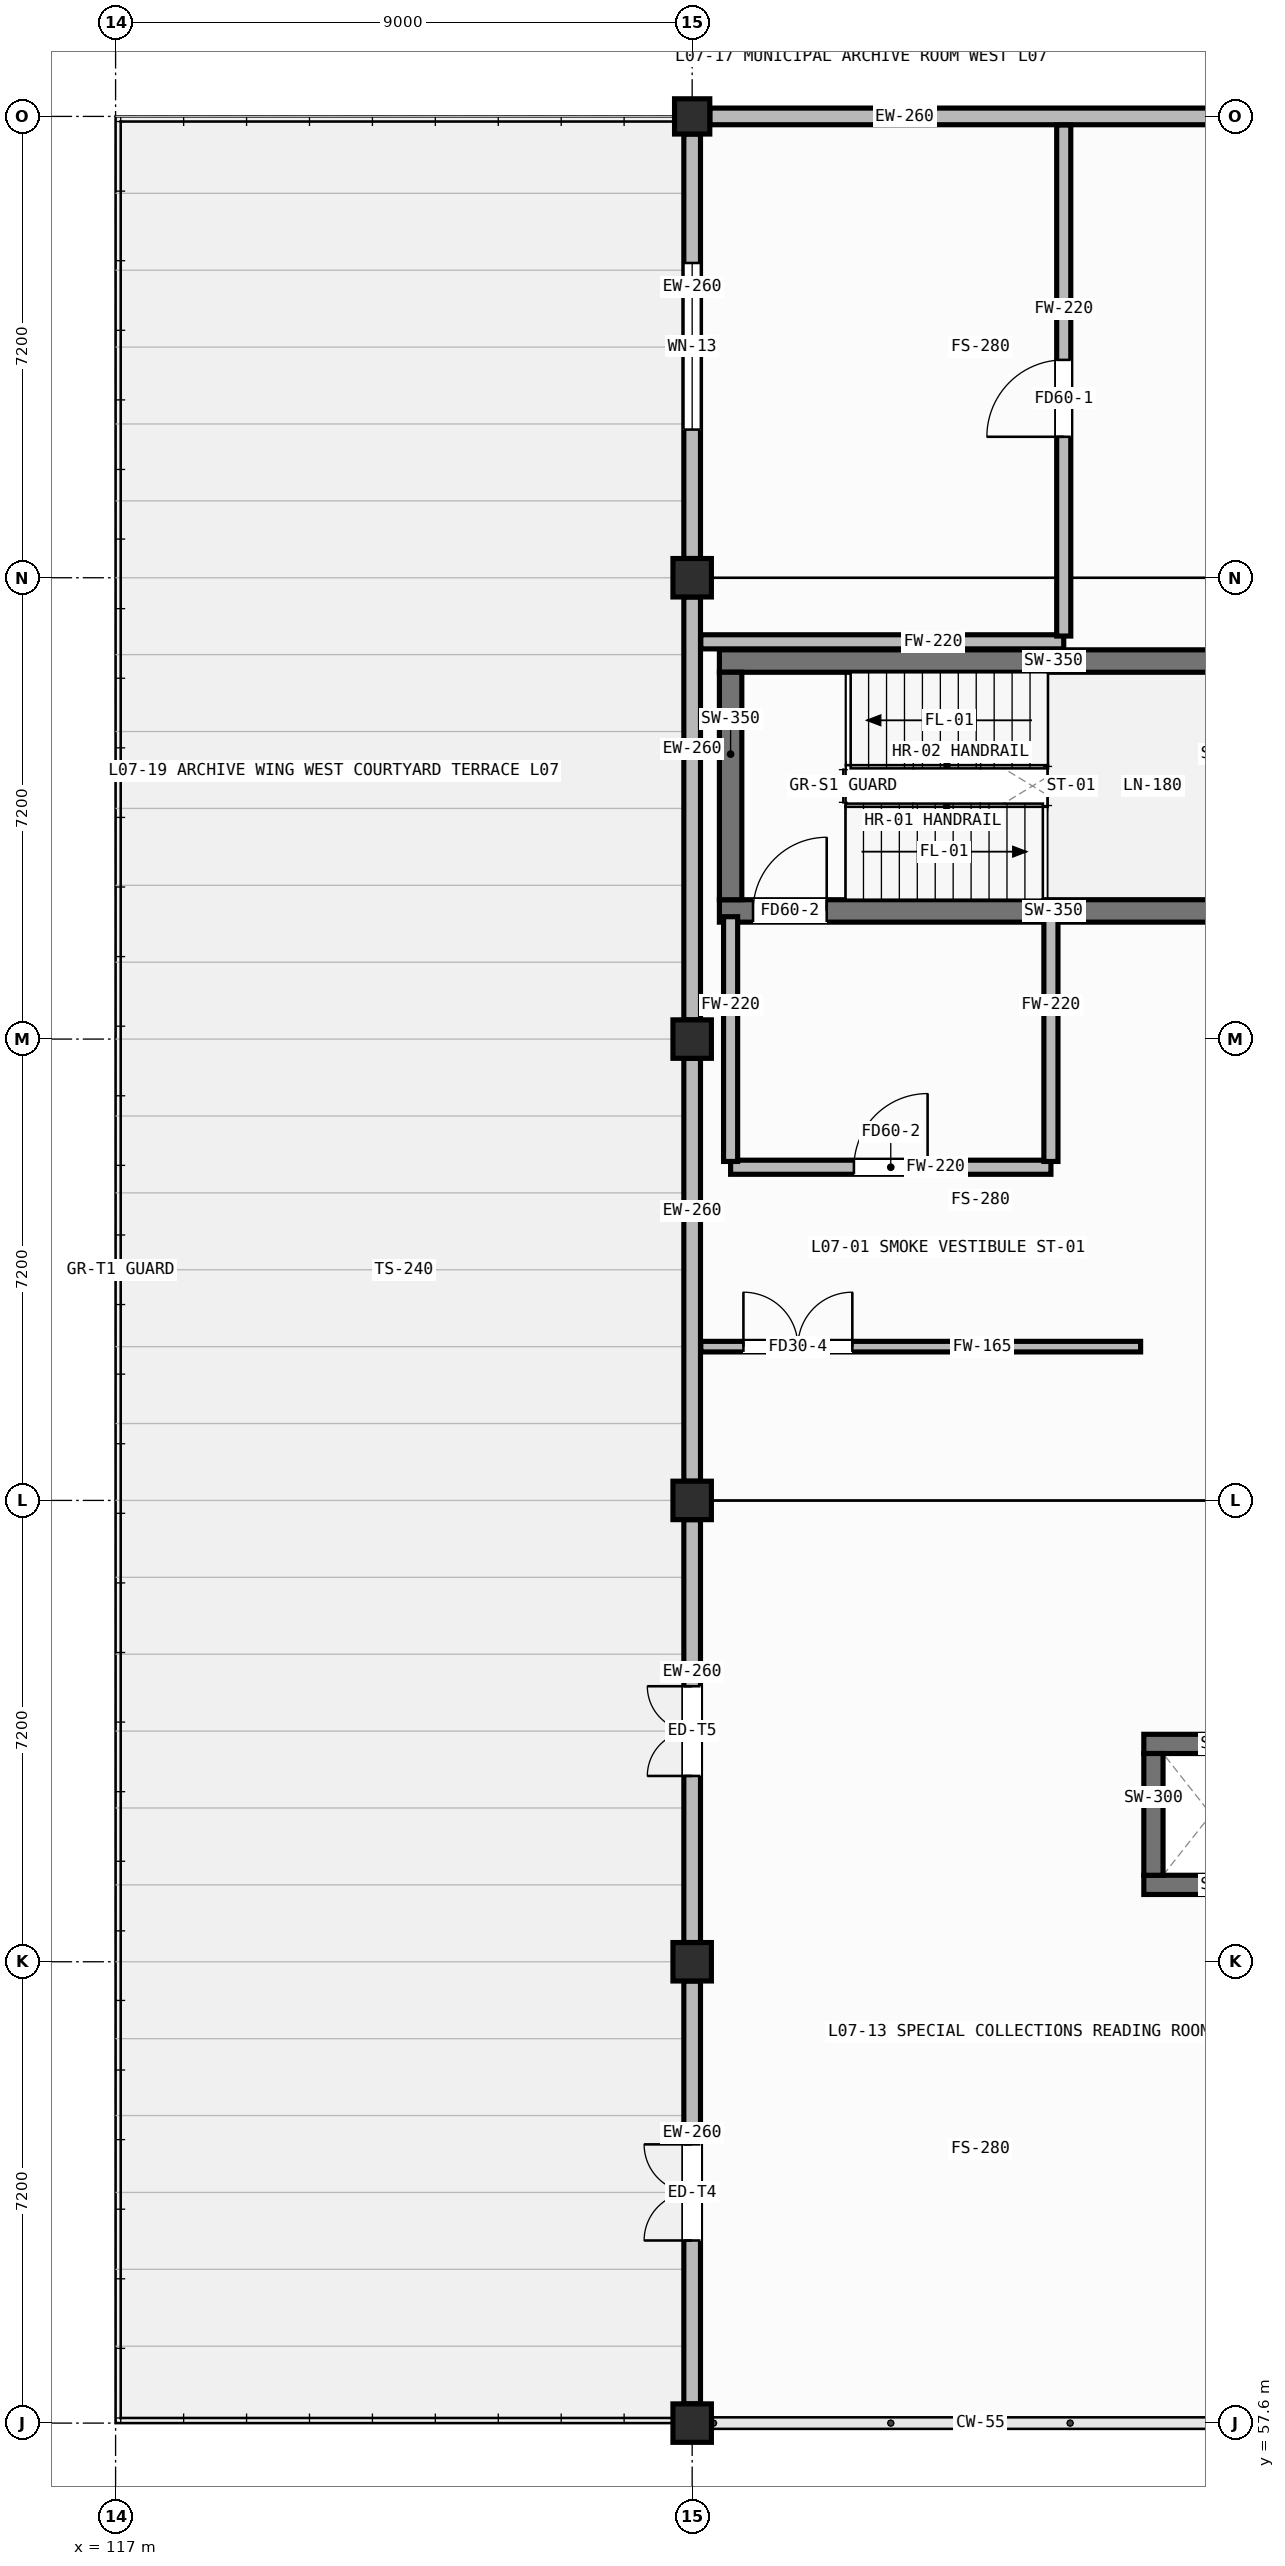
"""IFC4 building model, lengths in metres.
Left out: names, types, materials, properties, quantities, classifications, styles, units other than length and angle.
Written with IfcOpenShell. Run it as: python <this file> out.ifc"""

import sys

from ifc_helpers import new_model, si_unit, direction, frame, frame_2d, origin, origin_2d, place, context, subcontext, project, spatial, rectangle, hollow_rectangle, extrude, element, fill, save


model = new_model("IFC4")
c1 = context("Model", 3, precision=1e-05, world=origin(), true_north=direction((0.0, 1.0)))
c2 = subcontext(c1, "Body", "Model", "MODEL_VIEW")
j1 = project(units=[si_unit("LENGTHUNIT", "METRE"), si_unit("PLANEANGLEUNIT", "RADIAN")], contexts=[c1])
p1 = place(None, origin())
s1 = spatial("IfcSite", under=j1, at=p1, CompositionType="ELEMENT")
p2 = place(p1, origin())
s2 = spatial("IfcBuilding", under=s1, at=p2, CompositionType="ELEMENT")
p3 = place(p2, frame((0.0, 0.0, 24.2)))
s3 = spatial("IfcBuildingStorey", under=s2, at=p3, CompositionType="ELEMENT", Elevation=24.2)
for number, where, z_axis, x_axis in (
    (1, (126.0, 57.6, 0.0), (0.0, 0.0, 1.0), (1.0, 0.0, 0.0)),
    (2, (126.0, 64.8, 0.0), (0.0, 0.0, 1.0), (1.0, 0.0, 0.0)),
    (3, (126.0, 72.0, 0.0), (0.0, 0.0, 1.0), (1.0, 0.0, 0.0)),
    (4, (126.0, 79.2, 0.0), (0.0, 0.0, 1.0), (1.0, 0.0, 0.0)),
    (5, (126.0, 86.4, 0.0), (0.0, 0.0, 1.0), (1.0, 0.0, 0.0)),
):
    element("IfcColumn", number, at=place(p3, frame(where, z_axis=z_axis, x_axis=x_axis)), inside=s3, PredefinedType="COLUMN", context=c2, shape_type="SweptSolid", body=[
        extrude(hollow_rectangle(XDim=0.6, YDim=0.6, WallThickness=0.025, at=origin_2d()), origin(), (0.0, 0.0, 1.0), 3.6),
    ])
p4 = place(p3, frame((126.0, 93.6, 0.0), z_axis=(0.0, 0.0, 1.0), x_axis=(1.0, 0.0, 0.0)))
e6 = element("IfcColumn", 6, at=p4, inside=s3, PredefinedType="COLUMN", context=c2, shape_type="SweptSolid", body=[
    extrude(hollow_rectangle(XDim=0.55, YDim=0.55, WallThickness=0.022, at=origin_2d()), origin(), (0.0, 0.0, 1.0), 3.6),
])
p5 = place(p3, frame((134.725, 93.6, 0.0), z_axis=(0.0, 0.0, 1.0), x_axis=(-1.0, 0.0, 0.0)))
e7 = element("IfcWall", 7, at=p5, inside=s3, PredefinedType="STANDARD", context=c2, shape_type="SweptSolid", body=[
    extrude(rectangle(XDim=8.45, YDim=0.26, at=frame_2d((4.225, 0.0))), origin(), (0.0, 0.0, 1.0), 2.92),
])
p6 = place(p3, frame((126.0, 57.9, 0.0), z_axis=(0.0, 0.0, 1.0), x_axis=(0.0, 1.0, 0.0)))
e8 = element("IfcWall", 8, at=p6, inside=s3, PredefinedType="STANDARD", context=c2, shape_type="SweptSolid", body=[
    extrude(rectangle(XDim=6.6, YDim=0.26, at=frame_2d((3.3, 0.0))), origin(), (0.0, 0.0, 1.0), 2.92),
])
p7 = place(p6, frame((2.55, 0.0, 0.0)))
e9 = element("IfcOpeningElement", 9, at=p7, cuts=e8, PredefinedType="OPENING", context=c2, shape_type="SweptSolid", body=[
    extrude(rectangle(XDim=1.5, YDim=2.05, at=frame_2d((0.75, 1.025))), frame((0.0, 0.142, 0.0), z_axis=(0.0, -1.0, 0.0), x_axis=(1.0, 0.0, 0.0)), (0.0, 0.0, 1.0), 0.284),
])
p8 = place(p3, frame((126.0, 65.1, 0.0), z_axis=(0.0, 0.0, 1.0), x_axis=(0.0, 1.0, 0.0)))
e10 = element("IfcWall", 10, at=p8, inside=s3, PredefinedType="STANDARD", context=c2, shape_type="SweptSolid", body=[
    extrude(rectangle(XDim=6.6, YDim=0.26, at=frame_2d((3.3, 0.0))), origin(), (0.0, 0.0, 1.0), 2.92),
])
p9 = place(p8, frame((2.6, 0.0, 0.0)))
e11 = element("IfcOpeningElement", 11, at=p9, cuts=e10, PredefinedType="OPENING", context=c2, shape_type="SweptSolid", body=[
    extrude(rectangle(XDim=1.4, YDim=2.02, at=frame_2d((0.7, 1.01))), frame((0.0, 0.142, 0.0), z_axis=(0.0, -1.0, 0.0), x_axis=(1.0, 0.0, 0.0)), (0.0, 0.0, 1.0), 0.284),
])
p10 = place(p3, frame((126.0, 72.3, 0.0), z_axis=(0.0, 0.0, 1.0), x_axis=(0.0, 1.0, 0.0)))
e12 = element("IfcWall", 12, at=p10, inside=s3, PredefinedType="STANDARD", context=c2, shape_type="SweptSolid", body=[
    extrude(rectangle(XDim=6.6, YDim=0.26, at=frame_2d((3.3, 0.0))), origin(), (0.0, 0.0, 1.0), 2.92),
])
p11 = place(p3, frame((126.0, 79.5, 0.0), z_axis=(0.0, 0.0, 1.0), x_axis=(0.0, 1.0, 0.0)))
e13 = element("IfcWall", 13, at=p11, inside=s3, PredefinedType="STANDARD", context=c2, shape_type="SweptSolid", body=[
    extrude(rectangle(XDim=6.6, YDim=0.26, at=frame_2d((3.3, 0.0))), origin(), (0.0, 0.0, 1.0), 2.92),
])
p12 = place(p3, frame((126.0, 86.7, 0.0), z_axis=(0.0, 0.0, 1.0), x_axis=(0.0, 1.0, 0.0)))
e14 = element("IfcWall", 14, at=p12, inside=s3, PredefinedType="STANDARD", context=c2, shape_type="SweptSolid", body=[
    extrude(rectangle(XDim=6.625, YDim=0.26, at=frame_2d((3.312, 0.0))), origin(), (0.0, 0.0, 1.0), 2.92),
])
p13 = place(p12, frame((2.012, 0.0, 0.85)))
e15 = element("IfcOpeningElement", 15, at=p13, cuts=e14, PredefinedType="OPENING", context=c2, shape_type="SweptSolid", body=[
    extrude(rectangle(XDim=2.6, YDim=1.6, at=frame_2d((1.3, 0.8))), frame((0.0, 0.142, 0.0), z_axis=(0.0, -1.0, 0.0), x_axis=(1.0, 0.0, 0.0)), (0.0, 0.0, 1.0), 0.284),
])
p14 = place(p3, frame((126.425, 81.2, 0.0), z_axis=(0.0, 0.0, 1.0), x_axis=(1.0, 0.0, 0.0)))
e16 = element("IfcWall", 16, at=p14, inside=s3, PredefinedType="SHEAR", context=c2, shape_type="SweptSolid", body=[
    extrude(rectangle(XDim=8.15, YDim=0.35, at=frame_2d((4.075, 0.0))), origin(), (0.0, 0.0, 1.0), 3.32),
])
p15 = place(p14, frame((0.525, 0.0, 0.0)))
e17 = element("IfcOpeningElement", 17, at=p15, cuts=e16, PredefinedType="OPENING", context=c2, shape_type="SweptSolid", body=[
    extrude(rectangle(XDim=1.15, YDim=2.1, at=frame_2d((0.575, 1.05))), frame((0.0, 0.187, 0.0), z_axis=(0.0, -1.0, 0.0), x_axis=(1.0, 0.0, 0.0)), (0.0, 0.0, 1.0), 0.374),
])
p16 = place(p3, frame((126.425, 85.1, 0.0), z_axis=(0.0, 0.0, 1.0), x_axis=(1.0, 0.0, 0.0)))
e18 = element("IfcWall", 18, at=p16, inside=s3, PredefinedType="SHEAR", context=c2, shape_type="SweptSolid", body=[
    extrude(rectangle(XDim=8.15, YDim=0.35, at=frame_2d((4.075, 0.0))), origin(), (0.0, 0.0, 1.0), 3.32),
])
p17 = place(p3, frame((126.6, 81.375, 0.0), z_axis=(0.0, 0.0, 1.0), x_axis=(0.0, 1.0, 0.0)))
e19 = element("IfcWall", 19, at=p17, inside=s3, PredefinedType="SHEAR", context=c2, shape_type="SweptSolid", body=[
    extrude(rectangle(XDim=3.55, YDim=0.35, at=frame_2d((1.775, 0.0))), origin(), (0.0, 0.0, 1.0), 3.32),
])
for number, where, z_axis, x_axis in (
    (20, (133.05, 66.0, 0.0), (0.0, 0.0, 1.0), (1.0, 0.0, 0.0)),
    (21, (133.05, 68.2, 0.0), (0.0, 0.0, 1.0), (1.0, 0.0, 0.0)),
):
    element("IfcWall", number, at=place(p3, frame(where, z_axis=z_axis, x_axis=x_axis)), inside=s3, PredefinedType="SHEAR", context=c2, shape_type="SweptSolid", body=[
        extrude(rectangle(XDim=2.1, YDim=0.3, at=frame_2d((1.05, 0.0))), origin(), (0.0, 0.0, 1.0), 3.32),
    ])
p18 = place(p3, frame((133.2, 66.15, 0.0), z_axis=(0.0, 0.0, 1.0), x_axis=(0.0, 1.0, 0.0)))
e22 = element("IfcWall", 22, at=p18, inside=s3, PredefinedType="SHEAR", context=c2, shape_type="SweptSolid", body=[
    extrude(rectangle(XDim=1.9, YDim=0.3, at=frame_2d((0.95, 0.0))), origin(), (0.0, 0.0, 1.0), 3.32),
])
p19 = place(p3, frame((126.6, 77.2, 0.0), z_axis=(0.0, 0.0, 1.0), x_axis=(1.0, 0.0, 0.0)))
e23 = element("IfcWall", 23, at=p19, inside=s3, PredefinedType="PARTITIONING", context=c2, shape_type="SweptSolid", body=[
    extrude(rectangle(XDim=5.0, YDim=0.22, at=frame_2d((2.5, 0.0))), origin(), (0.0, 0.0, 1.0), 3.32),
])
p20 = place(p19, frame((1.925, 0.0, 0.0)))
e24 = element("IfcOpeningElement", 24, at=p20, cuts=e23, PredefinedType="OPENING", context=c2, shape_type="SweptSolid", body=[
    extrude(rectangle(XDim=1.15, YDim=2.1, at=frame_2d((0.575, 1.05))), frame((0.0, 0.122, 0.0), z_axis=(0.0, -1.0, 0.0), x_axis=(1.0, 0.0, 0.0)), (0.0, 0.0, 1.0), 0.244),
])
for number, where, z_axis, x_axis in (
    (25, (126.6, 77.29, 0.0), (0.0, 0.0, 1.0), (0.0, 1.0, 0.0)),
    (26, (131.6, 77.29, 0.0), (0.0, 0.0, 1.0), (0.0, 1.0, 0.0)),
):
    element("IfcWall", number, at=place(p3, frame(where, z_axis=z_axis, x_axis=x_axis)), inside=s3, PredefinedType="PARTITIONING", context=c2, shape_type="SweptSolid", body=[
        extrude(rectangle(XDim=3.82, YDim=0.22, at=frame_2d((1.91, 0.0))), origin(), (0.0, 0.0, 1.0), 3.32),
    ])
p21 = place(p3, frame((126.135, 74.4, 0.0), z_axis=(0.0, 0.0, 1.0), x_axis=(1.0, 0.0, 0.0)))
e27 = element("IfcWall", 27, at=p21, inside=s3, PredefinedType="PARTITIONING", context=c2, shape_type="SweptSolid", body=[
    extrude(rectangle(XDim=6.865, YDim=0.165, at=frame_2d((3.433, 0.0))), origin(), (0.0, 0.0, 1.0), 3.32),
])
p22 = place(p21, frame((0.665, 0.0, 0.0)))
e28 = element("IfcOpeningElement", 28, at=p22, cuts=e27, PredefinedType="OPENING", context=c2, shape_type="SweptSolid", body=[
    extrude(rectangle(XDim=1.7, YDim=2.12, at=frame_2d((0.85, 1.06))), frame((0.0, 0.094, 0.0), z_axis=(0.0, -1.0, 0.0), x_axis=(1.0, 0.0, 0.0)), (0.0, 0.0, 1.0), 0.189),
])
p23 = place(p3, frame((126.135, 85.4, 0.0), z_axis=(0.0, 0.0, 1.0), x_axis=(1.0, 0.0, 0.0)))
e29 = element("IfcWall", 29, at=p23, inside=s3, PredefinedType="PARTITIONING", context=c2, shape_type="SweptSolid", body=[
    extrude(rectangle(XDim=5.665, YDim=0.22, at=frame_2d((2.833, 0.0))), origin(), (0.0, 0.0, 1.0), 3.32),
])
p24 = place(p3, frame((131.8, 85.49, 0.0), z_axis=(0.0, 0.0, 1.0), x_axis=(0.0, 1.0, 0.0)))
e30 = element("IfcWall", 30, at=p24, inside=s3, PredefinedType="PARTITIONING", context=c2, shape_type="SweptSolid", body=[
    extrude(rectangle(XDim=7.975, YDim=0.22, at=frame_2d((3.988, 0.0))), origin(), (0.0, 0.0, 1.0), 3.32),
])
p25 = place(p24, frame((3.11, 0.0, 0.0)))
e31 = element("IfcOpeningElement", 31, at=p25, cuts=e30, PredefinedType="OPENING", context=c2, shape_type="SweptSolid", body=[
    extrude(rectangle(XDim=1.2, YDim=2.1, at=frame_2d((0.6, 1.05))), frame((0.0, 0.122, 0.0), z_axis=(0.0, -1.0, 0.0), x_axis=(1.0, 0.0, 0.0)), (0.0, 0.0, 1.0), 0.244),
])
p26 = place(p7, origin())
e32 = element("IfcDoor", 32, at=p26, inside=s3, OperationType="DOUBLE_DOOR_SINGLE_SWING", PredefinedType="DOOR", context=c2, shape_type="SweptSolid", body=[
    extrude(rectangle(XDim=1.5, YDim=2.05, at=frame_2d((0.75, 1.025))), frame((0.0, 0.025, 0.0), z_axis=(0.0, -1.0, 0.0), x_axis=(1.0, 0.0, 0.0)), (0.0, 0.0, 1.0), 0.05),
])
fill(e9, e32)
p27 = place(p9, origin())
e33 = element("IfcDoor", 33, at=p27, inside=s3, OperationType="DOUBLE_DOOR_SINGLE_SWING", PredefinedType="DOOR", context=c2, shape_type="SweptSolid", body=[
    extrude(rectangle(XDim=1.4, YDim=2.02, at=frame_2d((0.7, 1.01))), frame((0.0, 0.025, 0.0), z_axis=(0.0, -1.0, 0.0), x_axis=(1.0, 0.0, 0.0)), (0.0, 0.0, 1.0), 0.05),
])
fill(e11, e33)
p28 = place(p13, origin())
e34 = element("IfcWindow", 34, at=p28, inside=s3, PartitioningType="DOUBLE_PANEL_VERTICAL", PredefinedType="WINDOW", context=c2, shape_type="SweptSolid", body=[
    extrude(rectangle(XDim=2.6, YDim=1.6, at=frame_2d((1.3, 0.8))), frame((0.0, 0.03, 0.0), z_axis=(0.0, -1.0, 0.0), x_axis=(1.0, 0.0, 0.0)), (0.0, 0.0, 1.0), 0.06),
])
fill(e15, e34)
p29 = place(p15, origin())
e35 = element("IfcDoor", 35, at=p29, inside=s3, OperationType="SINGLE_SWING_RIGHT", PredefinedType="DOOR", context=c2, shape_type="SweptSolid", body=[
    extrude(rectangle(XDim=1.15, YDim=2.1, at=frame_2d((0.575, 1.05))), frame((0.0, 0.025, 0.0), z_axis=(0.0, -1.0, 0.0), x_axis=(1.0, 0.0, 0.0)), (0.0, 0.0, 1.0), 0.05),
])
fill(e17, e35)
p30 = place(p20, origin())
e36 = element("IfcDoor", 36, at=p30, inside=s3, OperationType="SINGLE_SWING_RIGHT", PredefinedType="DOOR", context=c2, shape_type="SweptSolid", body=[
    extrude(rectangle(XDim=1.15, YDim=2.1, at=frame_2d((0.575, 1.05))), frame((0.0, 0.025, 0.0), z_axis=(0.0, -1.0, 0.0), x_axis=(1.0, 0.0, 0.0)), (0.0, 0.0, 1.0), 0.05),
])
fill(e24, e36)
p31 = place(p22, origin())
e37 = element("IfcDoor", 37, at=p31, inside=s3, OperationType="DOUBLE_DOOR_SINGLE_SWING", PredefinedType="DOOR", context=c2, shape_type="SweptSolid", body=[
    extrude(rectangle(XDim=1.7, YDim=2.12, at=frame_2d((0.85, 1.06))), frame((0.0, 0.025, 0.0), z_axis=(0.0, -1.0, 0.0), x_axis=(1.0, 0.0, 0.0)), (0.0, 0.0, 1.0), 0.05),
])
fill(e28, e37)
p32 = place(p25, origin())
e38 = element("IfcDoor", 38, at=p32, inside=s3, OperationType="SINGLE_SWING_LEFT", PredefinedType="DOOR", context=c2, shape_type="SweptSolid", body=[
    extrude(rectangle(XDim=1.2, YDim=2.1, at=frame_2d((0.6, 1.05))), frame((0.0, 0.025, 0.0), z_axis=(0.0, -1.0, 0.0), x_axis=(1.0, 0.0, 0.0)), (0.0, 0.0, 1.0), 0.05),
])
fill(e31, e38)
save(model, sys.argv[1])
